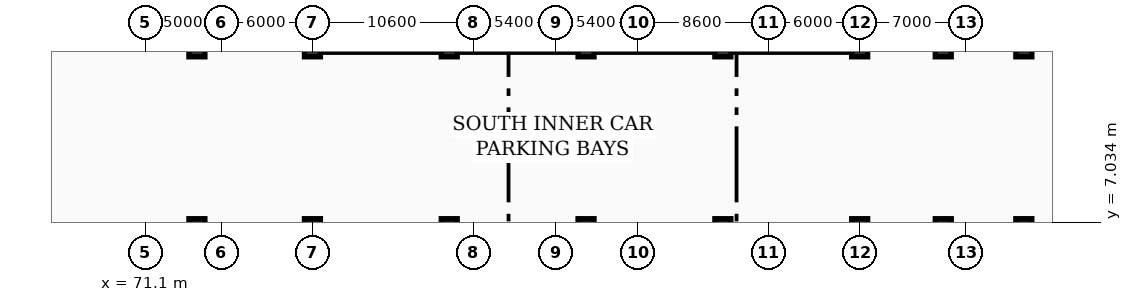
"""IFC4 building model, lengths in metres.
Left out: names, types, materials, properties, quantities, classifications, styles, units other than length and angle.
Written with IfcOpenShell. Run it as: python <this file> out.ifc"""

import sys

from ifc_helpers import new_model, si_unit, direction, frame, origin, origin_2d, place, context, subcontext, project, spatial, rectangle, extrude, element, save


model = new_model("IFC4")
c1 = context("Model", 3, precision=1e-05, world=origin(), true_north=direction((0.0, 1.0)))
c2 = subcontext(c1, "Body", "Model", "MODEL_VIEW")
j1 = project(units=[si_unit("LENGTHUNIT", "METRE"), si_unit("PLANEANGLEUNIT", "RADIAN")], contexts=[c1])
p1 = place(None, origin())
s1 = spatial("IfcSite", under=j1, at=p1, CompositionType="ELEMENT")
p2 = place(p1, origin())
s2 = spatial("IfcBuilding", under=s1, at=p2, CompositionType="ELEMENT")
p3 = place(p2, frame((0.0, 0.0, -3.6)))
s3 = spatial("IfcBuildingStorey", under=s2, at=p3, CompositionType="ELEMENT", Elevation=-3.6)
for number, where, z_axis, x_axis in (
    (1, (74.5, 6.8, 0.0), (0.0, 0.0, 1.0), (1.0, 0.0, 0.0)),
    (2, (74.5, 18.4, 0.0), (0.0, 0.0, 1.0), (1.0, 0.0, 0.0)),
    (3, (82.1, 6.8, 0.0), (0.0, 0.0, 1.0), (1.0, 0.0, 0.0)),
    (4, (82.1, 18.4, 0.0), (0.0, 0.0, 1.0), (1.0, 0.0, 0.0)),
    (5, (91.1, 6.8, 0.0), (0.0, 0.0, 1.0), (1.0, 0.0, 0.0)),
    (6, (91.1, 18.4, 0.0), (0.0, 0.0, 1.0), (1.0, 0.0, 0.0)),
    (7, (100.1, 6.8, 0.0), (0.0, 0.0, 1.0), (1.0, 0.0, 0.0)),
    (8, (100.1, 18.4, 0.0), (0.0, 0.0, 1.0), (1.0, 0.0, 0.0)),
    (9, (109.1, 6.8, 0.0), (0.0, 0.0, 1.0), (1.0, 0.0, 0.0)),
    (10, (109.1, 18.4, 0.0), (0.0, 0.0, 1.0), (1.0, 0.0, 0.0)),
    (11, (118.1, 6.8, 0.0), (0.0, 0.0, 1.0), (1.0, 0.0, 0.0)),
    (12, (118.1, 18.4, 0.0), (0.0, 0.0, 1.0), (1.0, 0.0, 0.0)),
    (13, (123.6, 6.8, 0.0), (0.0, 0.0, 1.0), (1.0, 0.0, 0.0)),
    (14, (123.6, 18.4, 0.0), (0.0, 0.0, 1.0), (1.0, 0.0, 0.0)),
    (15, (128.9, 6.8, 0.0), (0.0, 0.0, 1.0), (1.0, 0.0, 0.0)),
    (16, (128.9, 18.4, 0.0), (0.0, 0.0, 1.0), (1.0, 0.0, 0.0)),
):
    element("IfcColumn", number, at=place(p3, frame(where, z_axis=z_axis, x_axis=x_axis)), inside=s3, PredefinedType="COLUMN", context=c2, shape_type="SweptSolid", body=[
        extrude(rectangle(XDim=1.05, YDim=0.95, at=origin_2d()), origin(), (0.0, 0.0, 1.0), 3.6),
    ])
save(model, sys.argv[1])
